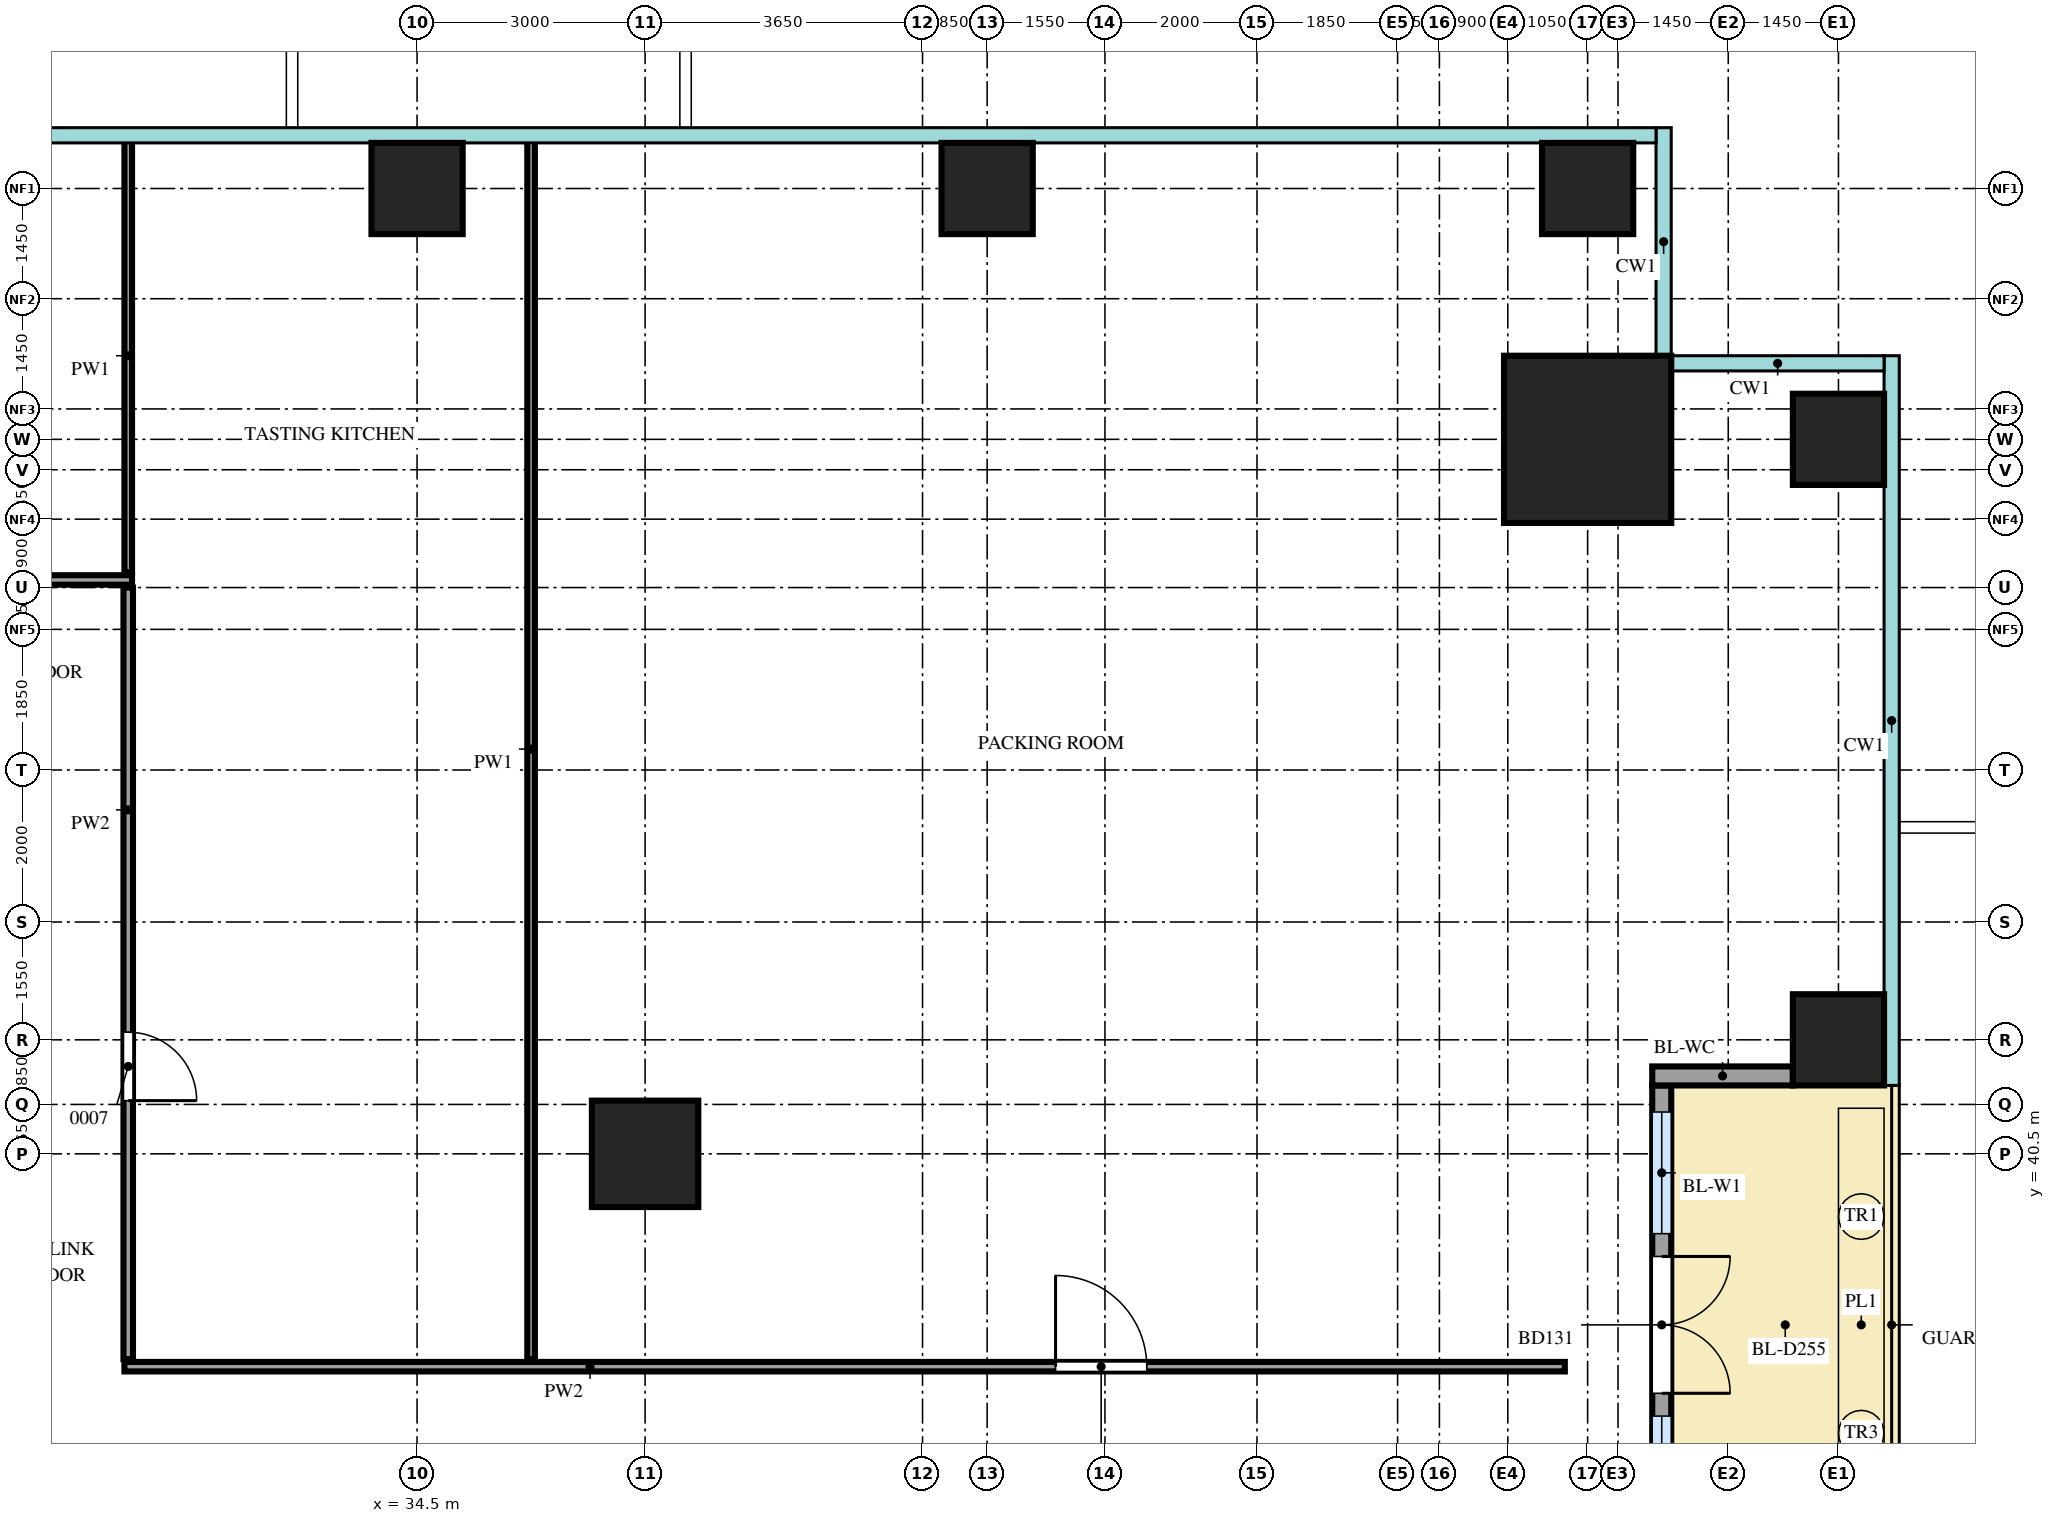
"""IFC4 building model, lengths in metres.
Left out: names, types, materials, properties, quantities, classifications, styles, units other than length and angle.
Written with IfcOpenShell. Run it as: python <this file> out.ifc"""

import sys

from ifc_helpers import new_model, si_unit, direction, frame, frame_2d, origin, origin_2d, place, context, subcontext, project, spatial, rectangle, extrude, source, transform, mapped, element, fill, save


model = new_model("IFC4")
c1 = context("Model", 3, precision=1e-05, world=origin(), true_north=direction((0.0, 1.0)))
c2 = subcontext(c1, "Body", "Model", "MODEL_VIEW")
j1 = project(units=[si_unit("LENGTHUNIT", "METRE"), si_unit("PLANEANGLEUNIT", "RADIAN")], contexts=[c1])
p1 = place(None, origin())
s1 = spatial("IfcSite", under=j1, at=p1, CompositionType="ELEMENT")
p2 = place(p1, origin())
s2 = spatial("IfcBuilding", under=s1, at=p2, CompositionType="ELEMENT")
p3 = place(p2, frame((0.0, 0.0, 64.5)))
s3 = spatial("IfcBuildingStorey", under=s2, at=p3, CompositionType="ELEMENT", Elevation=64.5)
m1 = source(origin(), c2, "Body", "SweptSolid", [
    extrude(rectangle(XDim=2.2, YDim=2.2, at=origin_2d()), origin(), (0.0, 0.0, 1.0), 4.5),
])
p4 = place(p3, frame((49.9, 49.9, 0.0), z_axis=(0.0, 0.0, 1.0), x_axis=(1.0, 0.0, 0.0)))
e1 = element("IfcColumn", 1, at=p4, inside=s3, PredefinedType="COLUMN", context=c2, shape_type="MappedRepresentation", body=[
    mapped(m1, transform((0.0, 0.0, 0.0))),
])
m2 = source(origin(), c2, "Body", "SweptSolid", [
    extrude(rectangle(XDim=1.2, YDim=1.2, at=origin_2d()), origin(), (0.0, 0.0, 1.0), 4.2),
])
for number, where, z_axis, x_axis in (
    (2, (53.2, 42.0, 0.0), (0.0, 0.0, 1.0), (1.0, 0.0, 0.0)),
    (3, (53.2, 49.9, 0.0), (0.0, 0.0, 1.0), (1.0, 0.0, 0.0)),
    (4, (34.5, 53.2, 0.0), (0.0, 0.0, 1.0), (1.0, 0.0, 0.0)),
    (5, (42.0, 53.2, 0.0), (0.0, 0.0, 1.0), (1.0, 0.0, 0.0)),
    (6, (49.9, 53.2, 0.0), (0.0, 0.0, 1.0), (1.0, 0.0, 0.0)),
):
    element("IfcColumn", number, at=place(p3, frame(where, z_axis=z_axis, x_axis=x_axis)), inside=s3, PredefinedType="COLUMN", context=c2, shape_type="MappedRepresentation", body=[
        mapped(m2, transform((0.0, 0.0, 0.0))),
    ])
m3 = source(origin(), c2, "Body", "SweptSolid", [
    extrude(rectangle(XDim=1.4, YDim=1.4, at=origin_2d()), origin(), (0.0, 0.0, 1.0), 4.2),
])
p5 = place(p3, frame((37.5, 40.5, 0.0), z_axis=(0.0, 0.0, 1.0), x_axis=(1.0, 0.0, 0.0)))
e7 = element("IfcColumn", 7, at=p5, inside=s3, PredefinedType="COLUMN", context=c2, shape_type="MappedRepresentation", body=[
    mapped(m3, transform((0.0, 0.0, 0.0))),
])
m4 = source(origin(), c2, "Body", "SweptSolid", [
    extrude(rectangle(XDim=6.3, YDim=0.25, at=frame_2d((3.15, 0.0))), origin(), (0.0, 0.0, 1.0), 3.6),
])
p6 = place(p3, frame((50.875, 35.1, 0.0), z_axis=(0.0, 0.0, 1.0), x_axis=(0.0, 1.0, 0.0)))
e8 = element("IfcWall", 8, at=p6, inside=s3, PredefinedType="SOLIDWALL", context=c2, shape_type="MappedRepresentation", body=[
    mapped(m4, transform((0.0, 0.0, 0.0))),
])
m5 = source(origin(), c2, "Body", "SweptSolid", [
    extrude(rectangle(XDim=1.6, YDim=2.4, at=frame_2d((0.8, 1.2))), frame((0.0, 0.135, 0.0), z_axis=(0.0, -1.0, 0.0), x_axis=(1.0, 0.0, 0.0)), (0.0, 0.0, 1.0), 0.27),
])
p7 = place(p6, frame((0.35, 0.0, 0.0)))
e9 = element("IfcOpeningElement", 9, at=p7, cuts=e8, PredefinedType="OPENING", context=c2, shape_type="MappedRepresentation", body=[
    mapped(m5, transform((0.0, 0.0, 0.0))),
])
p8 = place(p6, frame((4.35, 0.0, 0.0)))
e10 = element("IfcOpeningElement", 10, at=p8, cuts=e8, PredefinedType="OPENING", context=c2, shape_type="MappedRepresentation", body=[
    mapped(m5, transform((0.0, 0.0, 0.0))),
])
m6 = source(origin(), c2, "Body", "SweptSolid", [
    extrude(rectangle(XDim=1.8, YDim=2.4, at=frame_2d((0.9, 1.2))), frame((0.0, 0.135, 0.0), z_axis=(0.0, -1.0, 0.0), x_axis=(1.0, 0.0, 0.0)), (0.0, 0.0, 1.0), 0.27),
])
p9 = place(p6, frame((2.25, 0.0, 0.0)))
e11 = element("IfcOpeningElement", 11, at=p9, cuts=e8, PredefinedType="OPENING", context=c2, shape_type="MappedRepresentation", body=[
    mapped(m6, transform((0.0, 0.0, 0.0))),
])
m7 = source(origin(), c2, "Body", "SweptSolid", [
    extrude(rectangle(XDim=1.85, YDim=0.25, at=frame_2d((0.925, 0.0))), origin(), (0.0, 0.0, 1.0), 3.6),
])
p10 = place(p3, frame((52.6, 41.525, 0.0), z_axis=(0.0, 0.0, 1.0), x_axis=(-1.0, 0.0, 0.0)))
e12 = element("IfcWall", 12, at=p10, inside=s3, PredefinedType="SOLIDWALL", context=c2, shape_type="MappedRepresentation", body=[
    mapped(m7, transform((0.0, 0.0, 0.0))),
])
m8 = source(origin(), c2, "Body", "SweptSolid", [
    extrude(rectangle(XDim=18.95, YDim=0.125, at=frame_2d((9.475, 0.0))), origin(), (0.0, 0.0, 1.0), 4.3),
])
p11 = place(p3, frame((30.65, 37.7, 0.0), z_axis=(0.0, 0.0, 1.0), x_axis=(1.0, 0.0, 0.0)))
e13 = element("IfcWall", 13, at=p11, inside=s3, PredefinedType="PARTITIONING", context=c2, shape_type="MappedRepresentation", body=[
    mapped(m8, transform((0.0, 0.0, 0.0))),
])
m9 = source(origin(), c2, "Body", "SweptSolid", [
    extrude(rectangle(XDim=1.2, YDim=2.1, at=frame_2d((0.6, 1.05))), frame((0.0, 0.073, 0.0), z_axis=(0.0, -1.0, 0.0), x_axis=(1.0, 0.0, 0.0)), (0.0, 0.0, 1.0), 0.145),
])
p12 = place(p11, frame((12.25, 0.0, 0.0)))
e14 = element("IfcOpeningElement", 14, at=p12, cuts=e13, PredefinedType="OPENING", context=c2, shape_type="MappedRepresentation", body=[
    mapped(m9, transform((0.0, 0.0, 0.0))),
])
m10 = source(origin(), c2, "Body", "SweptSolid", [
    extrude(rectangle(XDim=10.15, YDim=0.125, at=frame_2d((5.075, 0.0))), origin(), (0.0, 0.0, 1.0), 4.3),
])
p13 = place(p3, frame((30.7, 37.8, 0.0), z_axis=(0.0, 0.0, 1.0), x_axis=(0.0, 1.0, 0.0)))
e15 = element("IfcWall", 15, at=p13, inside=s3, PredefinedType="PARTITIONING", context=c2, shape_type="MappedRepresentation", body=[
    mapped(m10, transform((0.0, 0.0, 0.0))),
])
m11 = source(origin(), c2, "Body", "SweptSolid", [
    extrude(rectangle(XDim=0.9, YDim=2.1, at=frame_2d((0.45, 1.05))), frame((0.0, 0.073, 0.0), z_axis=(0.0, -1.0, 0.0), x_axis=(1.0, 0.0, 0.0)), (0.0, 0.0, 1.0), 0.145),
])
p14 = place(p13, frame((3.4, 0.0, 0.0)))
e16 = element("IfcOpeningElement", 16, at=p14, cuts=e15, PredefinedType="OPENING", context=c2, shape_type="MappedRepresentation", body=[
    mapped(m11, transform((0.0, 0.0, 0.0))),
])
m12 = source(origin(), c2, "Body", "SweptSolid", [
    extrude(rectangle(XDim=16.05, YDim=0.1, at=frame_2d((8.025, 0.0))), origin(), (0.0, 0.0, 1.0), 4.3),
])
p15 = place(p3, frame((36.0, 37.8, 0.0), z_axis=(0.0, 0.0, 1.0), x_axis=(0.0, 1.0, 0.0)))
e17 = element("IfcWall", 17, at=p15, inside=s3, PredefinedType="PARTITIONING", context=c2, shape_type="MappedRepresentation", body=[
    mapped(m12, transform((0.0, 0.0, 0.0))),
])
m13 = source(origin(), c2, "Body", "SweptSolid", [
    extrude(rectangle(XDim=26.6, YDim=0.125, at=frame_2d((13.3, 0.0))), origin(), (0.0, 0.0, 1.0), 4.3),
])
p16 = place(p3, frame((4.15, 48.05, 0.0), z_axis=(0.0, 0.0, 1.0), x_axis=(1.0, 0.0, 0.0)))
e18 = element("IfcWall", 18, at=p16, inside=s3, PredefinedType="PARTITIONING", context=c2, shape_type="MappedRepresentation", body=[
    mapped(m13, transform((0.0, 0.0, 0.0))),
])
p17 = place(p16, frame((7.25, 0.0, 0.0)))
e19 = element("IfcOpeningElement", 19, at=p17, cuts=e18, PredefinedType="OPENING", context=c2, shape_type="MappedRepresentation", body=[
    mapped(m11, transform((0.0, 0.0, 0.0))),
])
p18 = place(p16, frame((20.5, 0.0, 0.0)))
e20 = element("IfcOpeningElement", 20, at=p18, cuts=e18, PredefinedType="OPENING", context=c2, shape_type="MappedRepresentation", body=[
    mapped(m11, transform((0.0, 0.0, 0.0))),
])
m14 = source(origin(), c2, "Body", "SweptSolid", [
    extrude(rectangle(XDim=5.7, YDim=0.1, at=frame_2d((2.85, 0.0))), origin(), (0.0, 0.0, 1.0), 4.3),
])
p19 = place(p3, frame((30.7, 48.15, 0.0), z_axis=(0.0, 0.0, 1.0), x_axis=(0.0, 1.0, 0.0)))
e21 = element("IfcWall", 21, at=p19, inside=s3, PredefinedType="PARTITIONING", context=c2, shape_type="MappedRepresentation", body=[
    mapped(m14, transform((0.0, 0.0, 0.0))),
])
m15 = source(origin(), c2, "Body", "SweptSolid", [
    extrude(rectangle(XDim=1.6, YDim=2.4, at=frame_2d((0.8, 1.2))), frame((0.0, 0.03, 0.0), z_axis=(0.0, -1.0, 0.0), x_axis=(1.0, 0.0, 0.0)), (0.0, 0.0, 1.0), 0.06),
])
p20 = place(p7, origin())
e22 = element("IfcWindow", 22, at=p20, inside=s3, PartitioningType="SINGLE_PANEL", PredefinedType="WINDOW", context=c2, shape_type="MappedRepresentation", body=[
    mapped(m15, transform((0.0, 0.0, 0.0))),
])
fill(e9, e22)
p21 = place(p8, origin())
e23 = element("IfcWindow", 23, at=p21, inside=s3, PartitioningType="SINGLE_PANEL", PredefinedType="WINDOW", context=c2, shape_type="MappedRepresentation", body=[
    mapped(m15, transform((0.0, 0.0, 0.0))),
])
fill(e10, e23)
m16 = source(origin(), c2, "Body", "SweptSolid", [
    extrude(rectangle(XDim=1.8, YDim=2.4, at=frame_2d((0.9, 1.2))), frame((0.0, 0.025, 0.0), z_axis=(0.0, -1.0, 0.0), x_axis=(1.0, 0.0, 0.0)), (0.0, 0.0, 1.0), 0.05),
])
p22 = place(p9, origin())
e24 = element("IfcDoor", 24, at=p22, inside=s3, OperationType="DOUBLE_DOOR_DOUBLE_SWING", PredefinedType="DOOR", context=c2, shape_type="MappedRepresentation", body=[
    mapped(m16, transform((0.0, 0.0, 0.0))),
])
fill(e11, e24)
m17 = source(origin(), c2, "Body", "SweptSolid", [
    extrude(rectangle(XDim=0.9, YDim=2.1, at=frame_2d((0.45, 1.05))), frame((0.0, 0.025, 0.0), z_axis=(0.0, -1.0, 0.0), x_axis=(1.0, 0.0, 0.0)), (0.0, 0.0, 1.0), 0.05),
])
p23 = place(p14, origin())
e25 = element("IfcDoor", 25, at=p23, inside=s3, OperationType="SINGLE_SWING_LEFT", PredefinedType="DOOR", context=c2, shape_type="MappedRepresentation", body=[
    mapped(m17, transform((0.0, 0.0, 0.0))),
])
fill(e16, e25)
m18 = source(origin(), c2, "Body", "SweptSolid", [
    extrude(rectangle(XDim=1.2, YDim=2.1, at=frame_2d((0.6, 1.05))), frame((0.0, 0.025, 0.0), z_axis=(0.0, -1.0, 0.0), x_axis=(1.0, 0.0, 0.0)), (0.0, 0.0, 1.0), 0.05),
])
p24 = place(p12, origin())
e26 = element("IfcDoor", 26, at=p24, inside=s3, OperationType="SINGLE_SWING_RIGHT", PredefinedType="DOOR", context=c2, shape_type="MappedRepresentation", body=[
    mapped(m18, transform((0.0, 0.0, 0.0))),
])
fill(e14, e26)
save(model, sys.argv[1])
